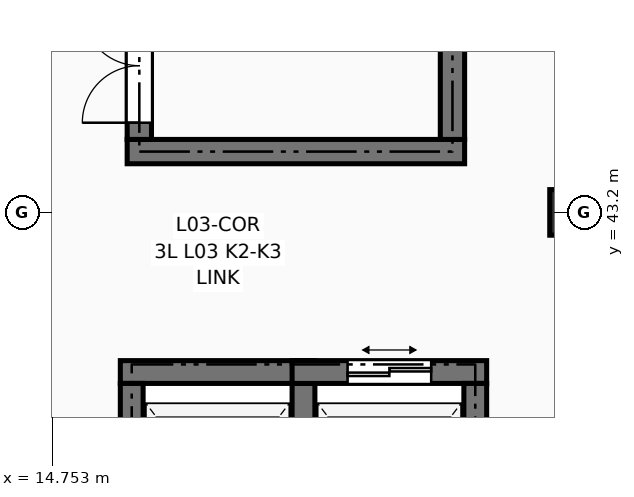
"""IFC4 building model, lengths in metres.
Left out: names, types, materials, properties, quantities, classifications, styles, units other than length and angle.
Written with IfcOpenShell. Run it as: python <this file> out.ifc"""

import sys

from ifc_helpers import new_model, si_unit, direction, frame, frame_2d, origin, origin_2d, place, context, subcontext, project, spatial, rectangle, extrude, element, fill, save


model = new_model("IFC4")
c1 = context("Model", 3, precision=1e-05, world=origin(), true_north=direction((0.0, 1.0)))
c2 = subcontext(c1, "Body", "Model", "MODEL_VIEW")
j1 = project(units=[si_unit("LENGTHUNIT", "METRE"), si_unit("PLANEANGLEUNIT", "RADIAN")], contexts=[c1])
p1 = place(None, origin())
s1 = spatial("IfcSite", under=j1, at=p1, CompositionType="ELEMENT")
p2 = place(p1, origin())
s2 = spatial("IfcBuilding", under=s1, at=p2, CompositionType="ELEMENT")
p3 = place(p2, frame((0.0, 0.0, 12.15)))
s3 = spatial("IfcBuildingStorey", under=s2, at=p3, CompositionType="ELEMENT", Elevation=12.15)
p4 = place(p3, frame((21.6, 43.2, 0.0), z_axis=(0.0, 0.0, 1.0), x_axis=(1.0, 0.0, 0.0)))
e1 = element("IfcColumn", 1, at=p4, inside=s3, PredefinedType="COLUMN", context=c2, shape_type="SweptSolid", body=[
    extrude(rectangle(XDim=0.6, YDim=0.6, at=origin_2d()), origin(), (0.0, 0.0, 1.0), 3.6),
])
p5 = place(p3, frame((15.74, 44.0, 0.0), z_axis=(0.0, 0.0, 1.0), x_axis=(1.0, 0.0, 0.0)))
e2 = element("IfcWall", 2, at=p5, inside=s3, PredefinedType="SHEAR", context=c2, shape_type="SweptSolid", body=[
    extrude(rectangle(XDim=4.44, YDim=0.32, at=frame_2d((2.22, 0.0))), origin(), (0.0, 0.0, 1.0), 3.39),
])
p6 = place(p3, frame((15.9, 44.16, 0.0), z_axis=(0.0, 0.0, 1.0), x_axis=(0.0, 1.0, 0.0)))
e3 = element("IfcWall", 3, at=p6, inside=s3, PredefinedType="SHEAR", context=c2, shape_type="SweptSolid", body=[
    extrude(rectangle(XDim=7.28, YDim=0.32, at=frame_2d((3.64, 0.0))), origin(), (0.0, 0.0, 1.0), 3.39),
])
p7 = place(p6, frame((0.22, 0.0, 0.0)))
e4 = element("IfcOpeningElement", 4, at=p7, cuts=e3, PredefinedType="OPENING", context=c2, shape_type="SweptSolid", body=[
    extrude(rectangle(XDim=1.5, YDim=2.2, at=frame_2d((0.75, 1.1))), frame((0.0, 0.172, 0.0), z_axis=(0.0, -1.0, 0.0), x_axis=(1.0, 0.0, 0.0)), (0.0, 0.0, 1.0), 0.344),
])
p8 = place(p3, frame((20.02, 44.16, 0.0), z_axis=(0.0, 0.0, 1.0), x_axis=(0.0, 1.0, 0.0)))
e5 = element("IfcWall", 5, at=p8, inside=s3, PredefinedType="SHEAR", context=c2, shape_type="SweptSolid", body=[
    extrude(rectangle(XDim=7.28, YDim=0.32, at=frame_2d((3.64, 0.0))), origin(), (0.0, 0.0, 1.0), 3.39),
])
p9 = place(p3, frame((15.65, 41.1, 0.0), z_axis=(0.0, 0.0, 1.0), x_axis=(1.0, 0.0, 0.0)))
e6 = element("IfcWall", 6, at=p9, inside=s3, PredefinedType="SHEAR", context=c2, shape_type="SweptSolid", body=[
    extrude(rectangle(XDim=2.56, YDim=0.3, at=frame_2d((1.28, 0.0))), origin(), (0.0, 0.0, 1.0), 3.39),
])
p10 = place(p3, frame((15.8, 37.98, 0.0), z_axis=(0.0, 0.0, 1.0), x_axis=(0.0, 1.0, 0.0)))
e7 = element("IfcWall", 7, at=p10, inside=s3, PredefinedType="SHEAR", context=c2, shape_type="SweptSolid", body=[
    extrude(rectangle(XDim=2.97, YDim=0.3, at=frame_2d((1.485, 0.0))), origin(), (0.0, 0.0, 1.0), 3.39),
])
p11 = place(p10, frame((0.935, 0.0, 0.0)))
e8 = element("IfcOpeningElement", 8, at=p11, cuts=e7, PredefinedType="OPENING", context=c2, shape_type="SweptSolid", body=[
    extrude(rectangle(XDim=1.1, YDim=2.2, at=frame_2d((0.55, 1.1))), frame((0.0, 0.162, 0.0), z_axis=(0.0, -1.0, 0.0), x_axis=(1.0, 0.0, 0.0)), (0.0, 0.0, 1.0), 0.324),
])
p12 = place(p3, frame((18.06, 37.98, 0.0), z_axis=(0.0, 0.0, 1.0), x_axis=(0.0, 1.0, 0.0)))
e9 = element("IfcWall", 9, at=p12, inside=s3, PredefinedType="SHEAR", context=c2, shape_type="SweptSolid", body=[
    extrude(rectangle(XDim=2.97, YDim=0.3, at=frame_2d((1.485, 0.0))), origin(), (0.0, 0.0, 1.0), 3.39),
])
p13 = place(p3, frame((17.91, 41.1, 0.0), z_axis=(0.0, 0.0, 1.0), x_axis=(1.0, 0.0, 0.0)))
e10 = element("IfcWall", 10, at=p13, inside=s3, PredefinedType="SHEAR", context=c2, shape_type="SweptSolid", body=[
    extrude(rectangle(XDim=2.56, YDim=0.3, at=frame_2d((1.28, 0.0))), origin(), (0.0, 0.0, 1.0), 3.39),
])
p14 = place(p13, frame((0.73, 0.0, 0.0)))
e11 = element("IfcOpeningElement", 11, at=p14, cuts=e10, PredefinedType="OPENING", context=c2, shape_type="SweptSolid", body=[
    extrude(rectangle(XDim=1.1, YDim=2.2, at=frame_2d((0.55, 1.1))), frame((0.0, 0.162, 0.0), z_axis=(0.0, -1.0, 0.0), x_axis=(1.0, 0.0, 0.0)), (0.0, 0.0, 1.0), 0.324),
])
p15 = place(p3, frame((20.32, 37.98, 0.0), z_axis=(0.0, 0.0, 1.0), x_axis=(0.0, 1.0, 0.0)))
e12 = element("IfcWall", 12, at=p15, inside=s3, PredefinedType="SHEAR", context=c2, shape_type="SweptSolid", body=[
    extrude(rectangle(XDim=2.97, YDim=0.3, at=frame_2d((1.485, 0.0))), origin(), (0.0, 0.0, 1.0), 3.39),
])
p16 = place(p7, origin())
e13 = element("IfcDoor", 13, at=p16, inside=s3, OperationType="DOUBLE_DOOR_SINGLE_SWING", PredefinedType="DOOR", context=c2, shape_type="SweptSolid", body=[
    extrude(rectangle(XDim=1.5, YDim=2.2, at=frame_2d((0.75, 1.1))), frame((0.0, 0.025, 0.0), z_axis=(0.0, -1.0, 0.0), x_axis=(1.0, 0.0, 0.0)), (0.0, 0.0, 1.0), 0.05),
])
fill(e4, e13)
p17 = place(p14, origin())
e14 = element("IfcDoor", 14, at=p17, inside=s3, OperationType="DOUBLE_DOOR_SLIDING", PredefinedType="DOOR", context=c2, shape_type="SweptSolid", body=[
    extrude(rectangle(XDim=1.1, YDim=2.2, at=frame_2d((0.55, 1.1))), frame((0.0, 0.025, 0.0), z_axis=(0.0, -1.0, 0.0), x_axis=(1.0, 0.0, 0.0)), (0.0, 0.0, 1.0), 0.05),
])
fill(e11, e14)
save(model, sys.argv[1])
